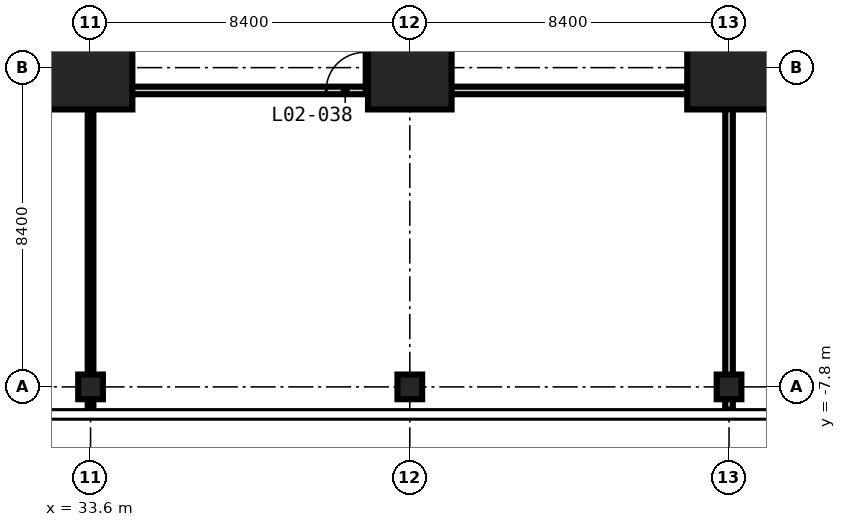
"""IFC4 building model, lengths in metres.
Left out: names, types, materials, properties, quantities, classifications, styles, units other than length and angle.
Written with IfcOpenShell. Run it as: python <this file> out.ifc"""

import sys

from ifc_helpers import new_model, si_unit, direction, frame, frame_2d, origin, origin_with_axes, origin_2d, place, context, subcontext, project, spatial, rectangle, extrude, element, fill, save


model = new_model("IFC4")
c1 = context("Model", 3, precision=1e-05, world=origin(), true_north=direction((0.0, 1.0)))
c2 = subcontext(c1, "Body", "Model", "MODEL_VIEW")
j1 = project(units=[si_unit("LENGTHUNIT", "METRE"), si_unit("PLANEANGLEUNIT", "RADIAN")], contexts=[c1])
p1 = place(None, origin())
s1 = spatial("IfcSite", under=j1, at=p1, CompositionType="ELEMENT")
p2 = place(p1, origin())
s2 = spatial("IfcBuilding", under=s1, at=p2, CompositionType="ELEMENT")
p3 = place(p2, frame((0.0, 0.0, 12.0)))
s3 = spatial("IfcBuildingStorey", under=s2, at=p3, CompositionType="ELEMENT", Elevation=12.0)
for number, where, z_axis, x_axis in (
    (1, (33.6, 0.6, -0.3), (0.0, 0.0, 1.0), (1.0, 0.0, 0.0)),
    (2, (42.0, 0.6, -0.3), (0.0, 0.0, 1.0), (1.0, 0.0, 0.0)),
    (3, (50.4, 0.6, -0.3), (0.0, 0.0, 1.0), (1.0, 0.0, 0.0)),
):
    element("IfcColumn", number, at=place(p3, frame(where, z_axis=z_axis, x_axis=x_axis)), inside=s3, PredefinedType="COLUMN", context=c2, shape_type="SweptSolid", body=[
        extrude(rectangle(XDim=2.2, YDim=2.2, at=origin_2d()), origin(), (0.0, 0.0, 1.0), 5.0),
    ])
for number, where, z_axis, x_axis in (
    (4, (33.6, -7.8, -0.3), (0.0, 0.0, 1.0), (1.0, 0.0, 0.0)),
    (5, (42.0, -7.8, -0.3), (0.0, 0.0, 1.0), (1.0, 0.0, 0.0)),
    (6, (50.4, -7.8, -0.3), (0.0, 0.0, 1.0), (1.0, 0.0, 0.0)),
):
    element("IfcColumn", number, at=place(p3, frame(where, z_axis=z_axis, x_axis=x_axis)), inside=s3, PredefinedType="COLUMN", context=c2, shape_type="SweptSolid", body=[
        extrude(rectangle(XDim=0.65, YDim=0.65, at=origin_2d()), origin(), (0.0, 0.0, 1.0), 5.0),
    ])
p4 = place(p3, origin_with_axes())
e7 = element("IfcWall", 7, at=p4, inside=s3, PredefinedType="PARTITIONING", context=c2, shape_type="SweptSolid", body=[
    extrude(rectangle(XDim=50.4, YDim=0.2, at=frame_2d((25.2, 0.0))), origin(), (0.0, 0.0, 1.0), 4.7),
])
p5 = place(p4, frame((9.6, 0.0, 0.0)))
e8 = element("IfcOpeningElement", 8, at=p5, cuts=e7, PredefinedType="OPENING", context=c2, shape_type="SweptSolid", body=[
    extrude(rectangle(XDim=1.0, YDim=2.1, at=frame_2d((0.5, 1.05))), frame((0.0, 0.11, 0.0), z_axis=(0.0, -1.0, 0.0), x_axis=(1.0, 0.0, 0.0)), (0.0, 0.0, 1.0), 0.22),
])
p6 = place(p4, frame((26.4, 0.0, 0.0)))
e9 = element("IfcOpeningElement", 9, at=p6, cuts=e7, PredefinedType="OPENING", context=c2, shape_type="SweptSolid", body=[
    extrude(rectangle(XDim=1.0, YDim=2.1, at=frame_2d((0.5, 1.05))), frame((0.0, 0.11, 0.0), z_axis=(0.0, -1.0, 0.0), x_axis=(1.0, 0.0, 0.0)), (0.0, 0.0, 1.0), 0.22),
])
p7 = place(p4, frame((39.8, 0.0, 0.0)))
e10 = element("IfcOpeningElement", 10, at=p7, cuts=e7, PredefinedType="OPENING", context=c2, shape_type="SweptSolid", body=[
    extrude(rectangle(XDim=1.0, YDim=2.1, at=frame_2d((0.5, 1.05))), frame((0.0, 0.11, 0.0), z_axis=(0.0, -1.0, 0.0), x_axis=(1.0, 0.0, 0.0)), (0.0, 0.0, 1.0), 0.22),
])
p8 = place(p3, frame((50.4, 0.0, 0.0), z_axis=(0.0, 0.0, 1.0), x_axis=(0.0, -1.0, 0.0)))
e11 = element("IfcWall", 11, at=p8, inside=s3, PredefinedType="PARTITIONING", context=c2, shape_type="SweptSolid", body=[
    extrude(rectangle(XDim=8.4, YDim=0.2, at=frame_2d((4.2, 0.0))), origin(), (0.0, 0.0, 1.0), 4.7),
])
p9 = place(p3, frame((33.6, -8.4, 0.0), z_axis=(0.0, 0.0, 1.0), x_axis=(0.0, 1.0, 0.0)))
e12 = element("IfcWall", 12, at=p9, inside=s3, PredefinedType="PARTITIONING", context=c2, shape_type="SweptSolid", body=[
    extrude(rectangle(XDim=8.4, YDim=0.15, at=frame_2d((4.2, 0.0))), origin(), (0.0, 0.0, 1.0), 4.7),
])
p10 = place(p7, origin())
e13 = element("IfcDoor", 13, at=p10, inside=s3, OperationType="SINGLE_SWING_RIGHT", PredefinedType="DOOR", context=c2, shape_type="SweptSolid", body=[
    extrude(rectangle(XDim=1.0, YDim=2.1, at=frame_2d((0.5, 1.05))), frame((0.0, 0.025, 0.0), z_axis=(0.0, -1.0, 0.0), x_axis=(1.0, 0.0, 0.0)), (0.0, 0.0, 1.0), 0.05),
])
fill(e10, e13)
save(model, sys.argv[1])
